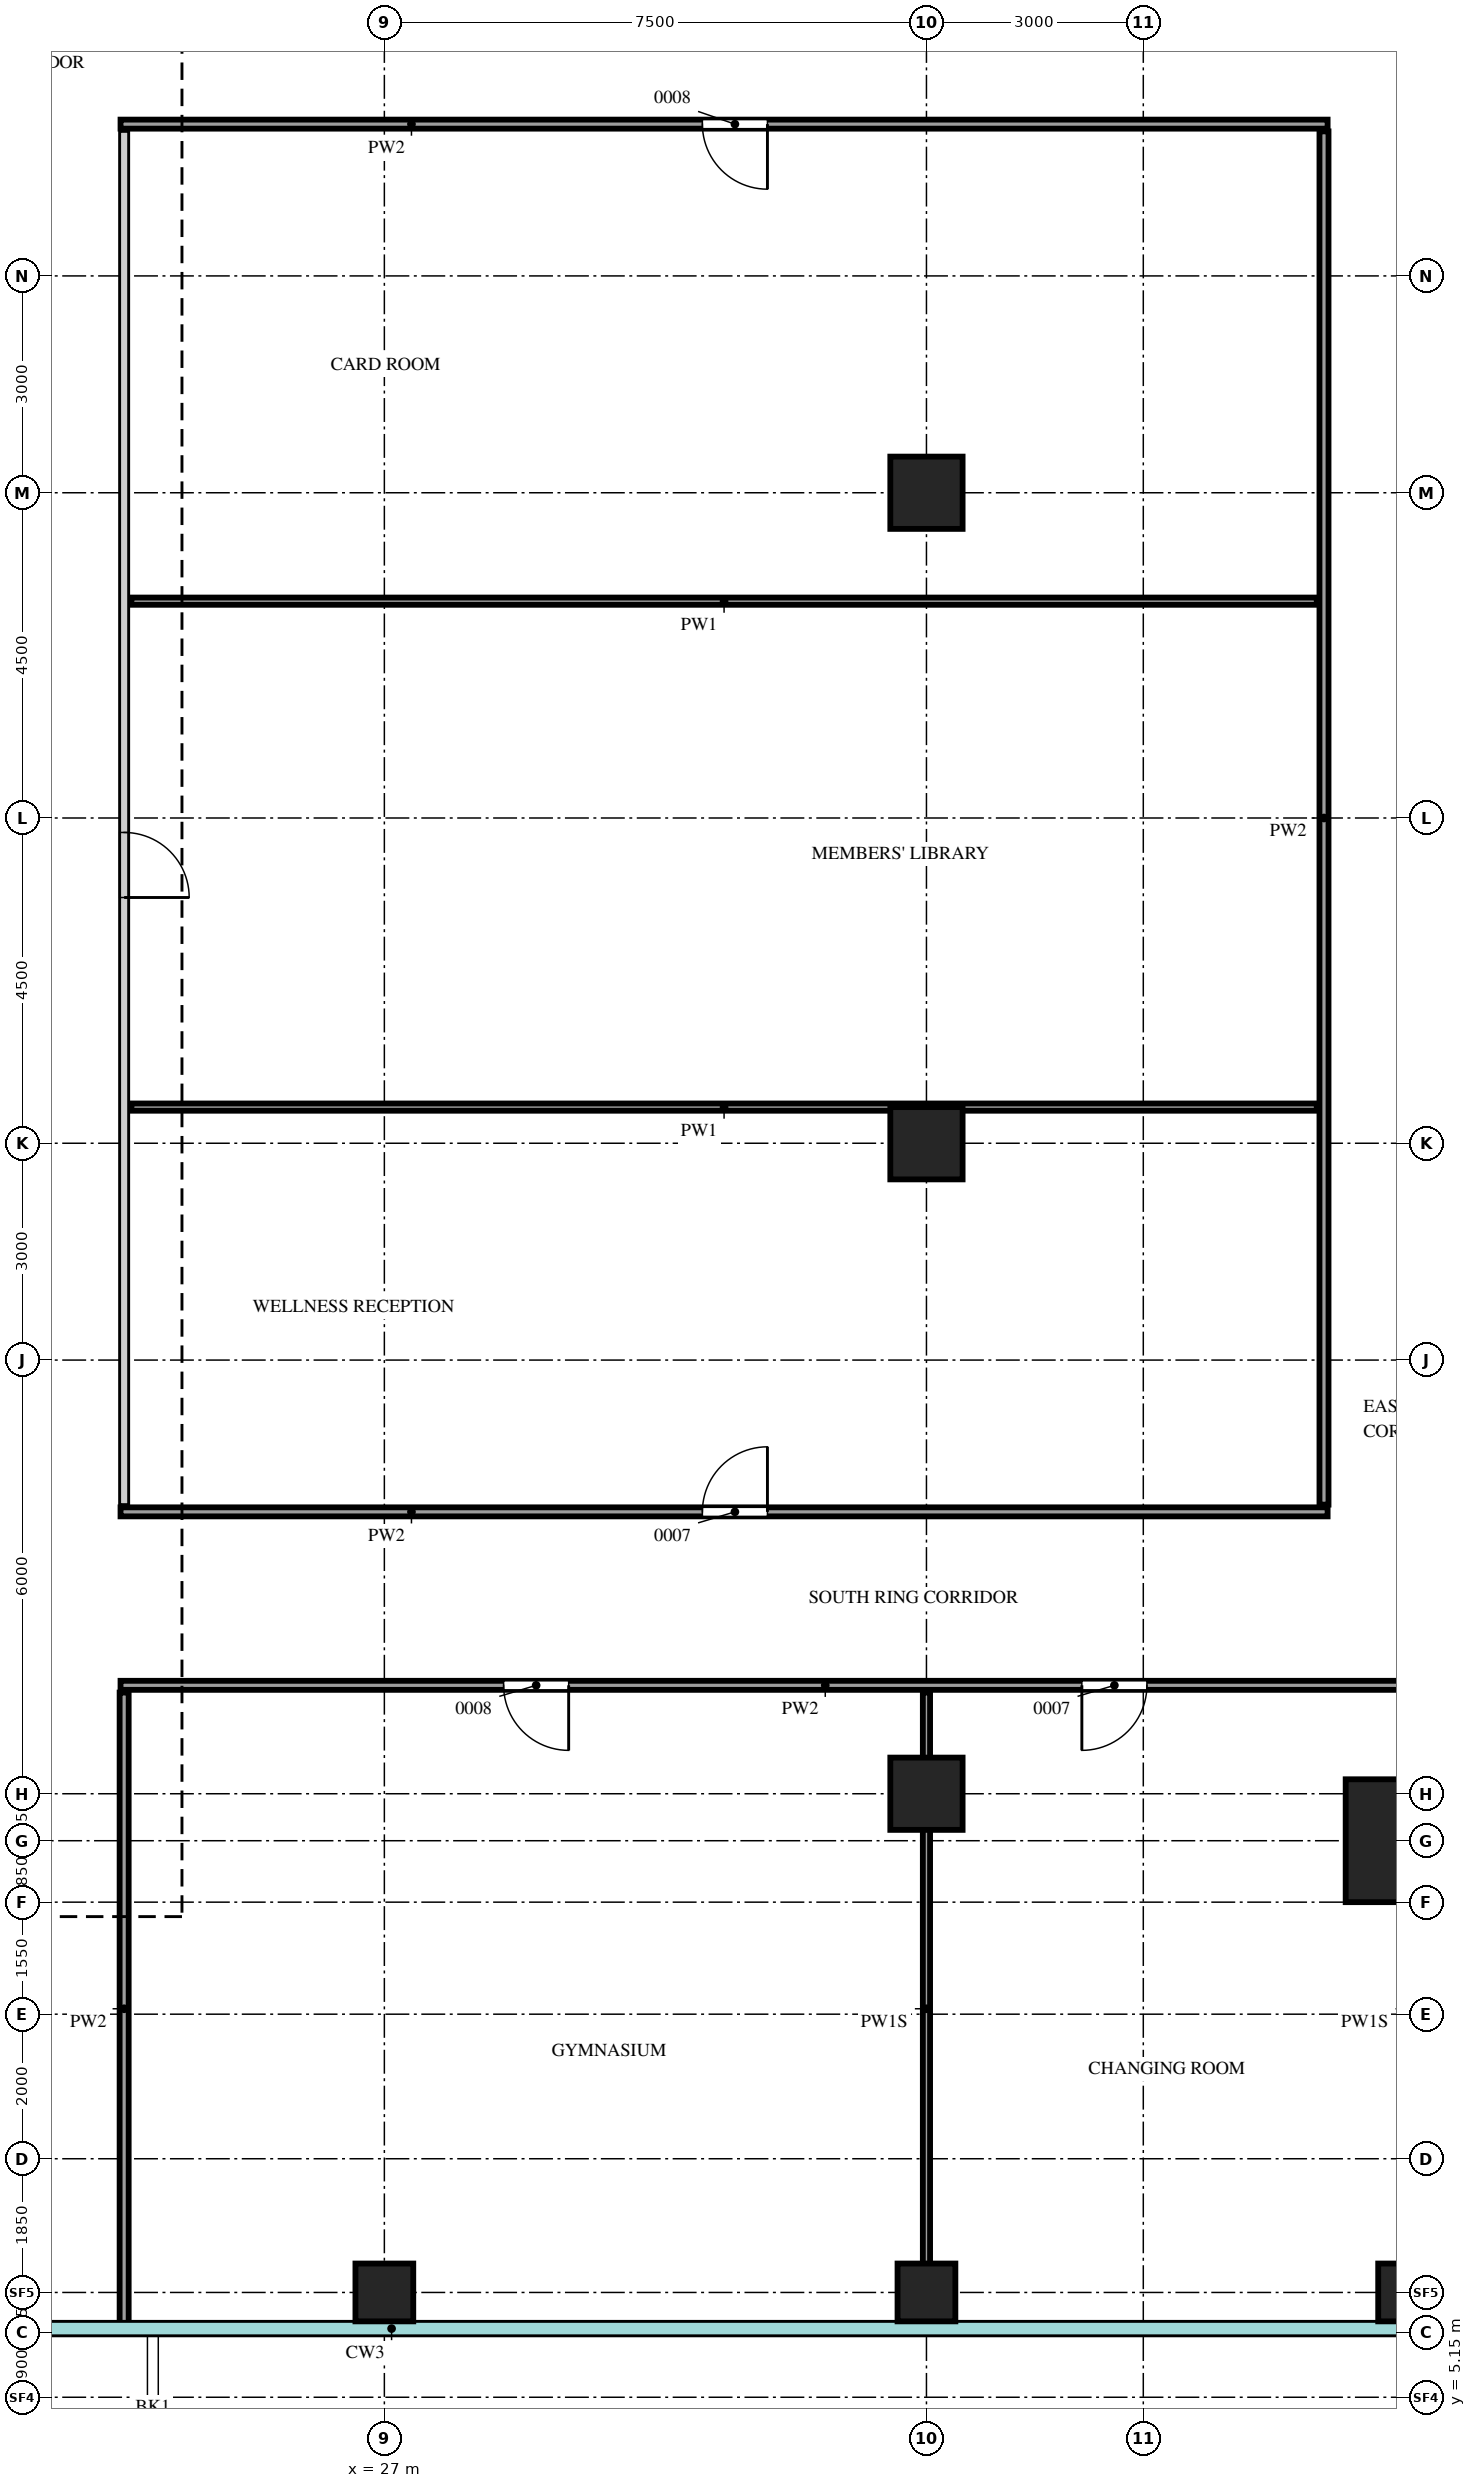
"""IFC4 building model, lengths in metres.
Left out: names, types, materials, properties, quantities, classifications, styles, units other than length and angle.
Written with IfcOpenShell. Run it as: python <this file> out.ifc"""

import sys

from ifc_helpers import new_model, si_unit, direction, frame, frame_2d, origin, origin_2d, place, context, subcontext, project, spatial, rectangle, extrude, source, transform, mapped, element, fill, save


model = new_model("IFC4")
c1 = context("Model", 3, precision=1e-05, world=origin(), true_north=direction((0.0, 1.0)))
c2 = subcontext(c1, "Body", "Model", "MODEL_VIEW")
j1 = project(units=[si_unit("LENGTHUNIT", "METRE"), si_unit("PLANEANGLEUNIT", "RADIAN")], contexts=[c1])
p1 = place(None, origin())
s1 = spatial("IfcSite", under=j1, at=p1, CompositionType="ELEMENT")
p2 = place(p1, origin())
s2 = spatial("IfcBuilding", under=s1, at=p2, CompositionType="ELEMENT")
p3 = place(p2, frame((0.0, 0.0, 302.2)))
s3 = spatial("IfcBuildingStorey", under=s2, at=p3, CompositionType="ELEMENT", Elevation=302.2)
m1 = source(origin(), c2, "Body", "SweptSolid", [
    extrude(rectangle(XDim=1.7, YDim=1.7, at=origin_2d()), origin(), (0.0, 0.0, 1.0), 3.75),
])
p4 = place(p3, frame((41.15, 12.85, 0.0), z_axis=(0.0, 0.0, 1.0), x_axis=(1.0, 0.0, 0.0)))
e1 = element("IfcColumn", 1, at=p4, inside=s3, PredefinedType="COLUMN", context=c2, shape_type="MappedRepresentation", body=[
    mapped(m1, transform((0.0, 0.0, 0.0))),
])
m2 = source(origin(), c2, "Body", "SweptSolid", [
    extrude(rectangle(XDim=0.8, YDim=0.8, at=origin_2d()), origin(), (0.0, 0.0, 1.0), 3.75),
])
for number, where, z_axis, x_axis in (
    (2, (27.0, 6.6, 0.0), (0.0, 0.0, 1.0), (1.0, 0.0, 0.0)),
    (3, (34.5, 6.6, 0.0), (0.0, 0.0, 1.0), (1.0, 0.0, 0.0)),
    (4, (41.15, 6.6, 0.0), (0.0, 0.0, 1.0), (1.0, 0.0, 0.0)),
):
    element("IfcColumn", number, at=place(p3, frame(where, z_axis=z_axis, x_axis=x_axis)), inside=s3, PredefinedType="COLUMN", context=c2, shape_type="MappedRepresentation", body=[
        mapped(m2, transform((0.0, 0.0, 0.0))),
    ])
m3 = source(origin(), c2, "Body", "SweptSolid", [
    extrude(rectangle(XDim=1.0, YDim=1.0, at=origin_2d()), origin(), (0.0, 0.0, 1.0), 3.75),
])
for number, where, z_axis, x_axis in (
    (5, (34.5, 13.5, 0.0), (0.0, 0.0, 1.0), (1.0, 0.0, 0.0)),
    (6, (34.5, 22.5, 0.0), (0.0, 0.0, 1.0), (1.0, 0.0, 0.0)),
    (7, (34.5, 31.5, 0.0), (0.0, 0.0, 1.0), (1.0, 0.0, 0.0)),
):
    element("IfcColumn", number, at=place(p3, frame(where, z_axis=z_axis, x_axis=x_axis)), inside=s3, PredefinedType="COLUMN", context=c2, shape_type="MappedRepresentation", body=[
        mapped(m3, transform((0.0, 0.0, 0.0))),
    ])
m4 = source(origin(), c2, "Body", "SweptSolid", [
    extrude(rectangle(XDim=8.75, YDim=0.125, at=frame_2d((4.375, 0.0))), origin(), (0.0, 0.0, 1.0), 3.8),
])
p5 = place(p3, frame((23.4, 6.15, 0.0), z_axis=(0.0, 0.0, 1.0), x_axis=(0.0, 1.0, 0.0)))
e8 = element("IfcWall", 8, at=p5, inside=s3, PredefinedType="PARTITIONING", context=c2, shape_type="MappedRepresentation", body=[
    mapped(m4, transform((0.0, 0.0, 0.0))),
])
m5 = source(origin(), c2, "Body", "SweptSolid", [
    extrude(rectangle(XDim=8.75, YDim=0.1, at=frame_2d((4.375, 0.0))), origin(), (0.0, 0.0, 1.0), 3.35),
])
p6 = place(p3, frame((34.5, 6.15, 0.0), z_axis=(0.0, 0.0, 1.0), x_axis=(0.0, 1.0, 0.0)))
e9 = element("IfcWall", 9, at=p6, inside=s3, PredefinedType="PARTITIONING", context=c2, shape_type="MappedRepresentation", body=[
    mapped(m5, transform((0.0, 0.0, 0.0))),
])
m6 = source(origin(), c2, "Body", "SweptSolid", [
    extrude(rectangle(XDim=19.1, YDim=0.125, at=frame_2d((9.55, 0.0))), origin(), (0.0, 0.0, 1.0), 3.8),
])
p7 = place(p3, frame((23.35, 15.0, 0.0), z_axis=(0.0, 0.0, 1.0), x_axis=(1.0, 0.0, 0.0)))
e10 = element("IfcWall", 10, at=p7, inside=s3, PredefinedType="PARTITIONING", context=c2, shape_type="MappedRepresentation", body=[
    mapped(m6, transform((0.0, 0.0, 0.0))),
])
m7 = source(origin(), c2, "Body", "SweptSolid", [
    extrude(rectangle(XDim=0.9, YDim=2.1, at=frame_2d((0.45, 1.05))), frame((0.0, 0.073, 0.0), z_axis=(0.0, -1.0, 0.0), x_axis=(1.0, 0.0, 0.0)), (0.0, 0.0, 1.0), 0.145),
])
p8 = place(p7, frame((5.3, 0.0, 0.0)))
e11 = element("IfcOpeningElement", 11, at=p8, cuts=e10, PredefinedType="OPENING", context=c2, shape_type="MappedRepresentation", body=[
    mapped(m7, transform((0.0, 0.0, 0.0))),
])
p9 = place(p7, frame((13.3, 0.0, 0.0)))
e12 = element("IfcOpeningElement", 12, at=p9, cuts=e10, PredefinedType="OPENING", context=c2, shape_type="MappedRepresentation", body=[
    mapped(m7, transform((0.0, 0.0, 0.0))),
])
p10 = place(p7, frame((17.95, 0.0, 0.0)))
e13 = element("IfcOpeningElement", 13, at=p10, cuts=e10, PredefinedType="OPENING", context=c2, shape_type="MappedRepresentation", body=[
    mapped(m7, transform((0.0, 0.0, 0.0))),
])
m8 = source(origin(), c2, "Body", "SweptSolid", [
    extrude(rectangle(XDim=16.7, YDim=0.125, at=frame_2d((8.35, 0.0))), origin(), (0.0, 0.0, 1.0), 3.8),
])
p11 = place(p3, frame((23.35, 17.4, 0.0), z_axis=(0.0, 0.0, 1.0), x_axis=(1.0, 0.0, 0.0)))
e14 = element("IfcWall", 14, at=p11, inside=s3, PredefinedType="PARTITIONING", context=c2, shape_type="MappedRepresentation", body=[
    mapped(m8, transform((0.0, 0.0, 0.0))),
])
p12 = place(p11, frame((8.05, 0.0, 0.0)))
e15 = element("IfcOpeningElement", 15, at=p12, cuts=e14, PredefinedType="OPENING", context=c2, shape_type="MappedRepresentation", body=[
    mapped(m7, transform((0.0, 0.0, 0.0))),
])
m9 = source(origin(), c2, "Body", "SweptSolid", [
    extrude(rectangle(XDim=19.0, YDim=0.125, at=frame_2d((9.5, 0.0))), origin(), (0.0, 0.0, 1.0), 3.8),
])
p13 = place(p3, frame((23.4, 17.5, 0.0), z_axis=(0.0, 0.0, 1.0), x_axis=(0.0, 1.0, 0.0)))
e16 = element("IfcWall", 16, at=p13, inside=s3, PredefinedType="PARTITIONING", context=c2, shape_type="MappedRepresentation", body=[
    mapped(m9, transform((0.0, 0.0, 0.0))),
])
p14 = place(p13, frame((8.4, 0.0, 0.0)))
e17 = element("IfcOpeningElement", 17, at=p14, cuts=e16, PredefinedType="OPENING", context=c2, shape_type="MappedRepresentation", body=[
    mapped(m7, transform((0.0, 0.0, 0.0))),
])
p15 = place(p3, frame((40.0, 17.5, 0.0), z_axis=(0.0, 0.0, 1.0), x_axis=(0.0, 1.0, 0.0)))
e18 = element("IfcWall", 18, at=p15, inside=s3, PredefinedType="PARTITIONING", context=c2, shape_type="MappedRepresentation", body=[
    mapped(m9, transform((0.0, 0.0, 0.0))),
])
m10 = source(origin(), c2, "Body", "SweptSolid", [
    extrude(rectangle(XDim=16.4, YDim=0.1, at=frame_2d((8.2, 0.0))), origin(), (0.0, 0.0, 1.0), 3.8),
])
for number, where, z_axis, x_axis in (
    (19, (23.5, 23.0, 0.0), (0.0, 0.0, 1.0), (1.0, 0.0, 0.0)),
    (20, (23.5, 30.0, 0.0), (0.0, 0.0, 1.0), (1.0, 0.0, 0.0)),
):
    element("IfcWall", number, at=place(p3, frame(where, z_axis=z_axis, x_axis=x_axis)), inside=s3, PredefinedType="PARTITIONING", context=c2, shape_type="MappedRepresentation", body=[
        mapped(m10, transform((0.0, 0.0, 0.0))),
    ])
p16 = place(p3, frame((23.35, 36.6, 0.0), z_axis=(0.0, 0.0, 1.0), x_axis=(1.0, 0.0, 0.0)))
e21 = element("IfcWall", 21, at=p16, inside=s3, PredefinedType="PARTITIONING", context=c2, shape_type="MappedRepresentation", body=[
    mapped(m8, transform((0.0, 0.0, 0.0))),
])
p17 = place(p16, frame((8.05, 0.0, 0.0)))
e22 = element("IfcOpeningElement", 22, at=p17, cuts=e21, PredefinedType="OPENING", context=c2, shape_type="MappedRepresentation", body=[
    mapped(m7, transform((0.0, 0.0, 0.0))),
])
m11 = source(origin(), c2, "Body", "SweptSolid", [
    extrude(rectangle(XDim=0.9, YDim=2.1, at=frame_2d((0.45, 1.05))), frame((0.0, 0.025, 0.0), z_axis=(0.0, -1.0, 0.0), x_axis=(1.0, 0.0, 0.0)), (0.0, 0.0, 1.0), 0.05),
])
p18 = place(p8, origin())
e23 = element("IfcDoor", 23, at=p18, inside=s3, OperationType="SINGLE_SWING_RIGHT", PredefinedType="DOOR", context=c2, shape_type="MappedRepresentation", body=[
    mapped(m11, transform((0.0, 0.0, 0.0))),
])
fill(e11, e23)
p19 = place(p9, origin())
e24 = element("IfcDoor", 24, at=p19, inside=s3, OperationType="SINGLE_SWING_LEFT", PredefinedType="DOOR", context=c2, shape_type="MappedRepresentation", body=[
    mapped(m11, transform((0.0, 0.0, 0.0))),
])
fill(e12, e24)
p20 = place(p12, origin())
e25 = element("IfcDoor", 25, at=p20, inside=s3, OperationType="SINGLE_SWING_LEFT", PredefinedType="DOOR", context=c2, shape_type="MappedRepresentation", body=[
    mapped(m11, transform((0.0, 0.0, 0.0))),
])
fill(e15, e25)
p21 = place(p14, origin())
e26 = element("IfcDoor", 26, at=p21, inside=s3, OperationType="SINGLE_SWING_LEFT", PredefinedType="DOOR", context=c2, shape_type="MappedRepresentation", body=[
    mapped(m11, transform((0.0, 0.0, 0.0))),
])
fill(e17, e26)
p22 = place(p17, origin())
e27 = element("IfcDoor", 27, at=p22, inside=s3, OperationType="SINGLE_SWING_RIGHT", PredefinedType="DOOR", context=c2, shape_type="MappedRepresentation", body=[
    mapped(m11, transform((0.0, 0.0, 0.0))),
])
fill(e22, e27)
save(model, sys.argv[1])
